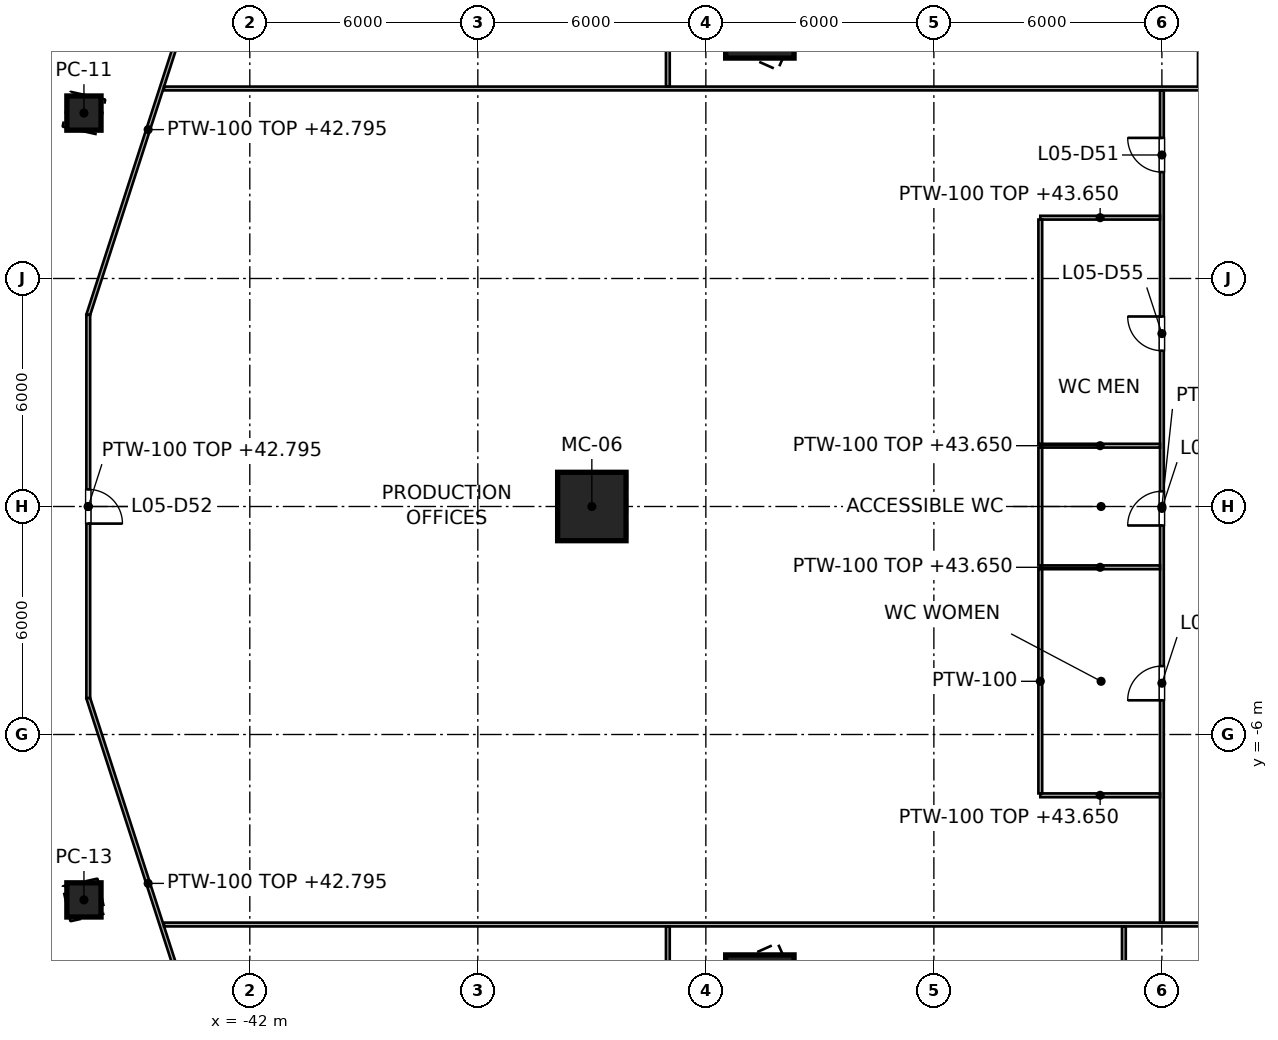
"""IFC4 building model, lengths in metres.
Left out: names, types, materials, properties, quantities, classifications, styles, units other than length and angle.
Written with IfcOpenShell. Run it as: python <this file> out.ifc"""

import sys

from ifc_helpers import new_model, si_unit, direction, frame, frame_2d, origin, origin_2d, place, context, subcontext, project, spatial, rectangle, hollow_rectangle, extrude, element, fill, save


model = new_model("IFC4")
c1 = context("Model", 3, precision=1e-05, world=origin(), true_north=direction((0.0, 1.0)))
c2 = subcontext(c1, "Body", "Model", "MODEL_VIEW")
j1 = project(units=[si_unit("LENGTHUNIT", "METRE"), si_unit("PLANEANGLEUNIT", "RADIAN")], contexts=[c1])
p1 = place(None, origin())
s1 = spatial("IfcSite", under=j1, at=p1, CompositionType="ELEMENT")
p2 = place(p1, origin())
s2 = spatial("IfcBuilding", under=s1, at=p2, CompositionType="ELEMENT")
p3 = place(p2, frame((0.0, 0.0, 37.4)))
s3 = spatial("IfcBuildingStorey", under=s2, at=p3, CompositionType="ELEMENT", Elevation=37.4)
for number, where, z_axis, x_axis in (
    (1, (-28.579, 12.7, 0.0), (0.0, 0.0, 1.0), (-0.914, 0.406, 0.0)),
    (2, (-33.0, 0.0, 0.0), (0.0, 0.0, 1.0), (-1.0, 0.0, 0.0)),
    (3, (-28.579, -12.7, 0.0), (0.0, 0.0, 1.0), (-0.914, -0.406, 0.0)),
):
    element("IfcColumn", number, at=place(p3, frame(where, z_axis=z_axis, x_axis=x_axis)), inside=s3, PredefinedType="COLUMN", context=c2, shape_type="SweptSolid", body=[
        extrude(hollow_rectangle(XDim=1.8, YDim=1.8, WallThickness=0.08, at=origin_2d()), origin(), (0.0, 0.0, 1.0), 5.9),
    ])
for number, where, z_axis, x_axis in (
    (4, (-46.365, 10.353, 0.0), (0.0, 0.0, 1.0), (-0.976, 0.218, 0.0)),
    (5, (-46.365, -10.353, 0.0), (0.0, 0.0, 1.0), (-0.976, -0.218, 0.0)),
):
    element("IfcColumn", number, at=place(p3, frame(where, z_axis=z_axis, x_axis=x_axis)), inside=s3, PredefinedType="COLUMN", context=c2, shape_type="SweptSolid", body=[
        extrude(hollow_rectangle(XDim=0.9, YDim=0.9, WallThickness=0.04, at=origin_2d()), origin(), (0.0, 0.0, 1.0), 6.6),
    ])
p4 = place(p3, frame((-43.099, 14.791, 0.0), z_axis=(0.0, 0.0, 1.0), x_axis=(-0.307713034182, -0.951479210805, 0.0)))
e6 = element("IfcWall", 6, at=p4, inside=s3, PredefinedType="PARTITIONING", context=c2, shape_type="SweptSolid", body=[
    extrude(rectangle(XDim=10.243, YDim=0.1, at=frame_2d((5.122, 0.0))), origin(), (0.0, 0.0, 1.0), 5.395),
])
p5 = place(p3, frame((-46.251, 5.045, 0.0), z_axis=(0.0, 0.0, 1.0), x_axis=(0.0, -1.0, 0.0)))
e7 = element("IfcWall", 7, at=p5, inside=s3, PredefinedType="PARTITIONING", context=c2, shape_type="SweptSolid", body=[
    extrude(rectangle(XDim=10.09, YDim=0.1, at=frame_2d((5.045, 0.0))), origin(), (0.0, 0.0, 1.0), 5.395),
])
p6 = place(p5, frame((4.595, 0.0, 0.0)))
e8 = element("IfcOpeningElement", 8, at=p6, cuts=e7, PredefinedType="OPENING", context=c2, shape_type="SweptSolid", body=[
    extrude(rectangle(XDim=0.9, YDim=2.1, at=frame_2d((0.45, 1.05))), frame((0.0, 0.05, 0.0), z_axis=(0.0, -1.0, 0.0), x_axis=(1.0, 0.0, 0.0)), (0.0, 0.0, 1.0), 0.1),
])
p7 = place(p3, frame((-46.251, -5.045, 0.0), z_axis=(0.0, 0.0, 1.0), x_axis=(0.307713034182, -0.951479210805, 0.0)))
e9 = element("IfcWall", 9, at=p7, inside=s3, PredefinedType="PARTITIONING", context=c2, shape_type="SweptSolid", body=[
    extrude(rectangle(XDim=10.243, YDim=0.1, at=frame_2d((5.122, 0.0))), origin(), (0.0, 0.0, 1.0), 5.395),
])
p8 = place(p3, frame((-44.256, 11.0, 0.0), z_axis=(0.0, 0.0, 1.0), x_axis=(1.0, 0.0, 0.0)))
e10 = element("IfcWall", 10, at=p8, inside=s3, PredefinedType="PARTITIONING", context=c2, shape_type="SweptSolid", body=[
    extrude(rectangle(XDim=88.512, YDim=0.1, at=frame_2d((44.256, 0.0))), origin(), (0.0, 0.0, 1.0), 5.318),
])
p9 = place(p8, frame((54.2, 0.0, 0.0)))
e11 = element("IfcOpeningElement", 11, at=p9, cuts=e10, PredefinedType="OPENING", context=c2, shape_type="SweptSolid", body=[
    extrude(rectangle(XDim=1.4, YDim=2.1, at=frame_2d((0.7, 1.05))), frame((0.0, 0.05, 0.0), z_axis=(0.0, -1.0, 0.0), x_axis=(1.0, 0.0, 0.0)), (0.0, 0.0, 1.0), 0.1),
])
p10 = place(p8, frame((32.9, 0.0, 0.0)))
e12 = element("IfcOpeningElement", 12, at=p10, cuts=e10, PredefinedType="OPENING", context=c2, shape_type="SweptSolid", body=[
    extrude(rectangle(XDim=1.4, YDim=2.1, at=frame_2d((0.7, 1.05))), frame((0.0, 0.05, 0.0), z_axis=(0.0, -1.0, 0.0), x_axis=(1.0, 0.0, 0.0)), (0.0, 0.0, 1.0), 0.1),
])
p11 = place(p8, frame((28.95, 0.0, 0.0)))
e13 = element("IfcOpeningElement", 13, at=p11, cuts=e10, PredefinedType="OPENING", context=c2, shape_type="SweptSolid", body=[
    extrude(rectangle(XDim=1.8, YDim=2.1, at=frame_2d((0.9, 1.05))), frame((0.0, 0.05, 0.0), z_axis=(0.0, -1.0, 0.0), x_axis=(1.0, 0.0, 0.0)), (0.0, 0.0, 1.0), 0.1),
])
p12 = place(p8, frame((42.35, 0.0, 0.0)))
e14 = element("IfcOpeningElement", 14, at=p12, cuts=e10, PredefinedType="OPENING", context=c2, shape_type="SweptSolid", body=[
    extrude(rectangle(XDim=0.9, YDim=2.1, at=frame_2d((0.45, 1.05))), frame((0.0, 0.05, 0.0), z_axis=(0.0, -1.0, 0.0), x_axis=(1.0, 0.0, 0.0)), (0.0, 0.0, 1.0), 0.1),
])
p13 = place(p8, frame((49.6, 0.0, 0.0)))
e15 = element("IfcOpeningElement", 15, at=p13, cuts=e10, PredefinedType="OPENING", context=c2, shape_type="SweptSolid", body=[
    extrude(rectangle(XDim=1.8, YDim=2.1, at=frame_2d((0.9, 1.05))), frame((0.0, 0.05, 0.0), z_axis=(0.0, -1.0, 0.0), x_axis=(1.0, 0.0, 0.0)), (0.0, 0.0, 1.0), 0.1),
])
p14 = place(p3, frame((-44.256, -11.0, 0.0), z_axis=(0.0, 0.0, 1.0), x_axis=(1.0, 0.0, 0.0)))
e16 = element("IfcWall", 16, at=p14, inside=s3, PredefinedType="PARTITIONING", context=c2, shape_type="SweptSolid", body=[
    extrude(rectangle(XDim=88.512, YDim=0.1, at=frame_2d((44.256, 0.0))), origin(), (0.0, 0.0, 1.0), 5.318),
])
p15 = place(p14, frame((32.9, 0.0, 0.0)))
e17 = element("IfcOpeningElement", 17, at=p15, cuts=e16, PredefinedType="OPENING", context=c2, shape_type="SweptSolid", body=[
    extrude(rectangle(XDim=1.4, YDim=2.1, at=frame_2d((0.7, 1.05))), frame((0.0, 0.05, 0.0), z_axis=(0.0, -1.0, 0.0), x_axis=(1.0, 0.0, 0.0)), (0.0, 0.0, 1.0), 0.1),
])
p16 = place(p14, frame((54.2, 0.0, 0.0)))
e18 = element("IfcOpeningElement", 18, at=p16, cuts=e16, PredefinedType="OPENING", context=c2, shape_type="SweptSolid", body=[
    extrude(rectangle(XDim=1.4, YDim=2.1, at=frame_2d((0.7, 1.05))), frame((0.0, 0.05, 0.0), z_axis=(0.0, -1.0, 0.0), x_axis=(1.0, 0.0, 0.0)), (0.0, 0.0, 1.0), 0.1),
])
p17 = place(p14, frame((38.65, 0.0, 0.0)))
e19 = element("IfcOpeningElement", 19, at=p17, cuts=e16, PredefinedType="OPENING", context=c2, shape_type="SweptSolid", body=[
    extrude(rectangle(XDim=1.8, YDim=2.1, at=frame_2d((0.9, 1.05))), frame((0.0, 0.05, 0.0), z_axis=(0.0, -1.0, 0.0), x_axis=(1.0, 0.0, 0.0)), (0.0, 0.0, 1.0), 0.1),
])
p18 = place(p14, frame((46.85, 0.0, 0.0)))
e20 = element("IfcOpeningElement", 20, at=p18, cuts=e16, PredefinedType="OPENING", context=c2, shape_type="SweptSolid", body=[
    extrude(rectangle(XDim=0.9, YDim=2.1, at=frame_2d((0.45, 1.05))), frame((0.0, 0.05, 0.0), z_axis=(0.0, -1.0, 0.0), x_axis=(1.0, 0.0, 0.0)), (0.0, 0.0, 1.0), 0.1),
])
p19 = place(p14, frame((57.05, 0.0, 0.0)))
e21 = element("IfcOpeningElement", 21, at=p19, cuts=e16, PredefinedType="OPENING", context=c2, shape_type="SweptSolid", body=[
    extrude(rectangle(XDim=1.8, YDim=2.1, at=frame_2d((0.9, 1.05))), frame((0.0, 0.05, 0.0), z_axis=(0.0, -1.0, 0.0), x_axis=(1.0, 0.0, 0.0)), (0.0, 0.0, 1.0), 0.1),
])
p20 = place(p14, frame((60.6, 0.0, 0.0)))
e22 = element("IfcOpeningElement", 22, at=p20, cuts=e16, PredefinedType="OPENING", context=c2, shape_type="SweptSolid", body=[
    extrude(rectangle(XDim=0.9, YDim=2.1, at=frame_2d((0.45, 1.05))), frame((0.0, 0.05, 0.0), z_axis=(0.0, -1.0, 0.0), x_axis=(1.0, 0.0, 0.0)), (0.0, 0.0, 1.0), 0.1),
])
p21 = place(p3, frame((-18.0, -10.95, 0.0), z_axis=(0.0, 0.0, 1.0), x_axis=(0.0, 1.0, 0.0)))
e23 = element("IfcWall", 23, at=p21, inside=s3, PredefinedType="PARTITIONING", context=c2, shape_type="SweptSolid", body=[
    extrude(rectangle(XDim=21.9, YDim=0.1, at=frame_2d((10.95, 0.0))), origin(), (0.0, 0.0, 1.0), 5.318),
])
p22 = place(p21, frame((19.75, 0.0, 0.0)))
e24 = element("IfcOpeningElement", 24, at=p22, cuts=e23, PredefinedType="OPENING", context=c2, shape_type="SweptSolid", body=[
    extrude(rectangle(XDim=0.9, YDim=2.1, at=frame_2d((0.45, 1.05))), frame((0.0, 0.05, 0.0), z_axis=(0.0, -1.0, 0.0), x_axis=(1.0, 0.0, 0.0)), (0.0, 0.0, 1.0), 0.1),
])
p23 = place(p21, frame((5.85, 0.0, 0.0)))
e25 = element("IfcOpeningElement", 25, at=p23, cuts=e23, PredefinedType="OPENING", context=c2, shape_type="SweptSolid", body=[
    extrude(rectangle(XDim=0.9, YDim=2.1, at=frame_2d((0.45, 1.05))), frame((0.0, 0.05, 0.0), z_axis=(0.0, -1.0, 0.0), x_axis=(1.0, 0.0, 0.0)), (0.0, 0.0, 1.0), 0.1),
])
p24 = place(p21, frame((10.45, 0.0, 0.0)))
e26 = element("IfcOpeningElement", 26, at=p24, cuts=e23, PredefinedType="OPENING", context=c2, shape_type="SweptSolid", body=[
    extrude(rectangle(XDim=0.9, YDim=2.1, at=frame_2d((0.45, 1.05))), frame((0.0, 0.05, 0.0), z_axis=(0.0, -1.0, 0.0), x_axis=(1.0, 0.0, 0.0)), (0.0, 0.0, 1.0), 0.1),
])
p25 = place(p21, frame((15.05, 0.0, 0.0)))
e27 = element("IfcOpeningElement", 27, at=p25, cuts=e23, PredefinedType="OPENING", context=c2, shape_type="SweptSolid", body=[
    extrude(rectangle(XDim=0.9, YDim=2.1, at=frame_2d((0.45, 1.05))), frame((0.0, 0.05, 0.0), z_axis=(0.0, -1.0, 0.0), x_axis=(1.0, 0.0, 0.0)), (0.0, 0.0, 1.0), 0.1),
])
for number, where, z_axis, x_axis in (
    (28, (-31.0, 11.05, 0.0), (0.0, 0.0, 1.0), (0.0, 1.0, 0.0)),
    (29, (-31.0, -11.05, 0.0), (0.0, 0.0, 1.0), (0.0, -1.0, 0.0)),
):
    element("IfcWall", number, at=place(p3, frame(where, z_axis=z_axis, x_axis=x_axis)), inside=s3, PredefinedType="PARTITIONING", context=c2, shape_type="SweptSolid", body=[
        extrude(rectangle(XDim=17.352, YDim=0.1, at=frame_2d((8.676, 0.0))), origin(), (0.0, 0.0, 1.0), 5.395),
    ])
p26 = place(p3, frame((-19.0, -11.05, 0.0), z_axis=(0.0, 0.0, 1.0), x_axis=(0.0, -1.0, 0.0)))
e30 = element("IfcWall", 30, at=p26, inside=s3, PredefinedType="PARTITIONING", context=c2, shape_type="SweptSolid", body=[
    extrude(rectangle(XDim=24.03, YDim=0.1, at=frame_2d((12.015, 0.0))), origin(), (0.0, 0.0, 1.0), 5.327),
])
for number, where, z_axis, x_axis in (
    (31, (-21.2, -7.6, 0.0), (0.0, 0.0, 1.0), (1.0, 0.0, 0.0)),
    (32, (-18.05, -1.6, 0.0), (0.0, 0.0, 1.0), (-1.0, 0.0, 0.0)),
):
    element("IfcWall", number, at=place(p3, frame(where, z_axis=z_axis, x_axis=x_axis)), inside=s3, PredefinedType="PARTITIONING", context=c2, shape_type="SweptSolid", body=[
        extrude(rectangle(XDim=3.15, YDim=0.1, at=frame_2d((1.575, 0.0))), origin(), (0.0, 0.0, 1.0), 6.25),
    ])
p27 = place(p3, frame((-21.2, -1.65, 0.0), z_axis=(0.0, 0.0, 1.0), x_axis=(0.0, -1.0, 0.0)))
e33 = element("IfcWall", 33, at=p27, inside=s3, PredefinedType="PARTITIONING", context=c2, shape_type="SweptSolid", body=[
    extrude(rectangle(XDim=5.9, YDim=0.1, at=frame_2d((2.95, 0.0))), origin(), (0.0, 0.0, 1.0), 5.318),
])
p28 = place(p3, frame((-18.05, 1.6, 0.0), z_axis=(0.0, 0.0, 1.0), x_axis=(-1.0, 0.0, 0.0)))
e34 = element("IfcWall", 34, at=p28, inside=s3, PredefinedType="PARTITIONING", context=c2, shape_type="SweptSolid", body=[
    extrude(rectangle(XDim=3.15, YDim=0.1, at=frame_2d((1.575, 0.0))), origin(), (0.0, 0.0, 1.0), 6.25),
])
p29 = place(p3, frame((-21.2, 1.55, 0.0), z_axis=(0.0, 0.0, 1.0), x_axis=(0.0, -1.0, 0.0)))
e35 = element("IfcWall", 35, at=p29, inside=s3, PredefinedType="PARTITIONING", context=c2, shape_type="SweptSolid", body=[
    extrude(rectangle(XDim=3.1, YDim=0.1, at=frame_2d((1.55, 0.0))), origin(), (0.0, 0.0, 1.0), 5.318),
])
p30 = place(p3, frame((-18.05, 7.6, 0.0), z_axis=(0.0, 0.0, 1.0), x_axis=(-1.0, 0.0, 0.0)))
e36 = element("IfcWall", 36, at=p30, inside=s3, PredefinedType="PARTITIONING", context=c2, shape_type="SweptSolid", body=[
    extrude(rectangle(XDim=3.15, YDim=0.1, at=frame_2d((1.575, 0.0))), origin(), (0.0, 0.0, 1.0), 6.25),
])
p31 = place(p3, frame((-21.2, 7.55, 0.0), z_axis=(0.0, 0.0, 1.0), x_axis=(0.0, -1.0, 0.0)))
e37 = element("IfcWall", 37, at=p31, inside=s3, PredefinedType="PARTITIONING", context=c2, shape_type="SweptSolid", body=[
    extrude(rectangle(XDim=5.9, YDim=0.1, at=frame_2d((2.95, 0.0))), origin(), (0.0, 0.0, 1.0), 5.318),
])
p32 = place(p22, origin())
e38 = element("IfcDoor", 38, at=p32, inside=s3, OperationType="SINGLE_SWING_RIGHT", PredefinedType="DOOR", context=c2, shape_type="SweptSolid", body=[
    extrude(rectangle(XDim=0.9, YDim=2.1, at=frame_2d((0.45, 1.05))), frame((0.0, 0.025, 0.0), z_axis=(0.0, -1.0, 0.0), x_axis=(1.0, 0.0, 0.0)), (0.0, 0.0, 1.0), 0.05),
])
fill(e24, e38)
p33 = place(p6, origin())
e39 = element("IfcDoor", 39, at=p33, inside=s3, OperationType="SINGLE_SWING_RIGHT", PredefinedType="DOOR", context=c2, shape_type="SweptSolid", body=[
    extrude(rectangle(XDim=0.9, YDim=2.1, at=frame_2d((0.45, 1.05))), frame((0.0, 0.025, 0.0), z_axis=(0.0, -1.0, 0.0), x_axis=(1.0, 0.0, 0.0)), (0.0, 0.0, 1.0), 0.05),
])
fill(e8, e39)
p34 = place(p23, origin())
e40 = element("IfcDoor", 40, at=p34, inside=s3, OperationType="SINGLE_SWING_LEFT", PredefinedType="DOOR", context=c2, shape_type="SweptSolid", body=[
    extrude(rectangle(XDim=0.9, YDim=2.1, at=frame_2d((0.45, 1.05))), frame((0.0, 0.025, 0.0), z_axis=(0.0, -1.0, 0.0), x_axis=(1.0, 0.0, 0.0)), (0.0, 0.0, 1.0), 0.05),
])
fill(e25, e40)
p35 = place(p24, origin())
e41 = element("IfcDoor", 41, at=p35, inside=s3, OperationType="SINGLE_SWING_LEFT", PredefinedType="DOOR", context=c2, shape_type="SweptSolid", body=[
    extrude(rectangle(XDim=0.9, YDim=2.1, at=frame_2d((0.45, 1.05))), frame((0.0, 0.025, 0.0), z_axis=(0.0, -1.0, 0.0), x_axis=(1.0, 0.0, 0.0)), (0.0, 0.0, 1.0), 0.05),
])
fill(e26, e41)
p36 = place(p25, origin())
e42 = element("IfcDoor", 42, at=p36, inside=s3, OperationType="SINGLE_SWING_RIGHT", PredefinedType="DOOR", context=c2, shape_type="SweptSolid", body=[
    extrude(rectangle(XDim=0.9, YDim=2.1, at=frame_2d((0.45, 1.05))), frame((0.0, 0.025, 0.0), z_axis=(0.0, -1.0, 0.0), x_axis=(1.0, 0.0, 0.0)), (0.0, 0.0, 1.0), 0.05),
])
fill(e27, e42)
save(model, sys.argv[1])
